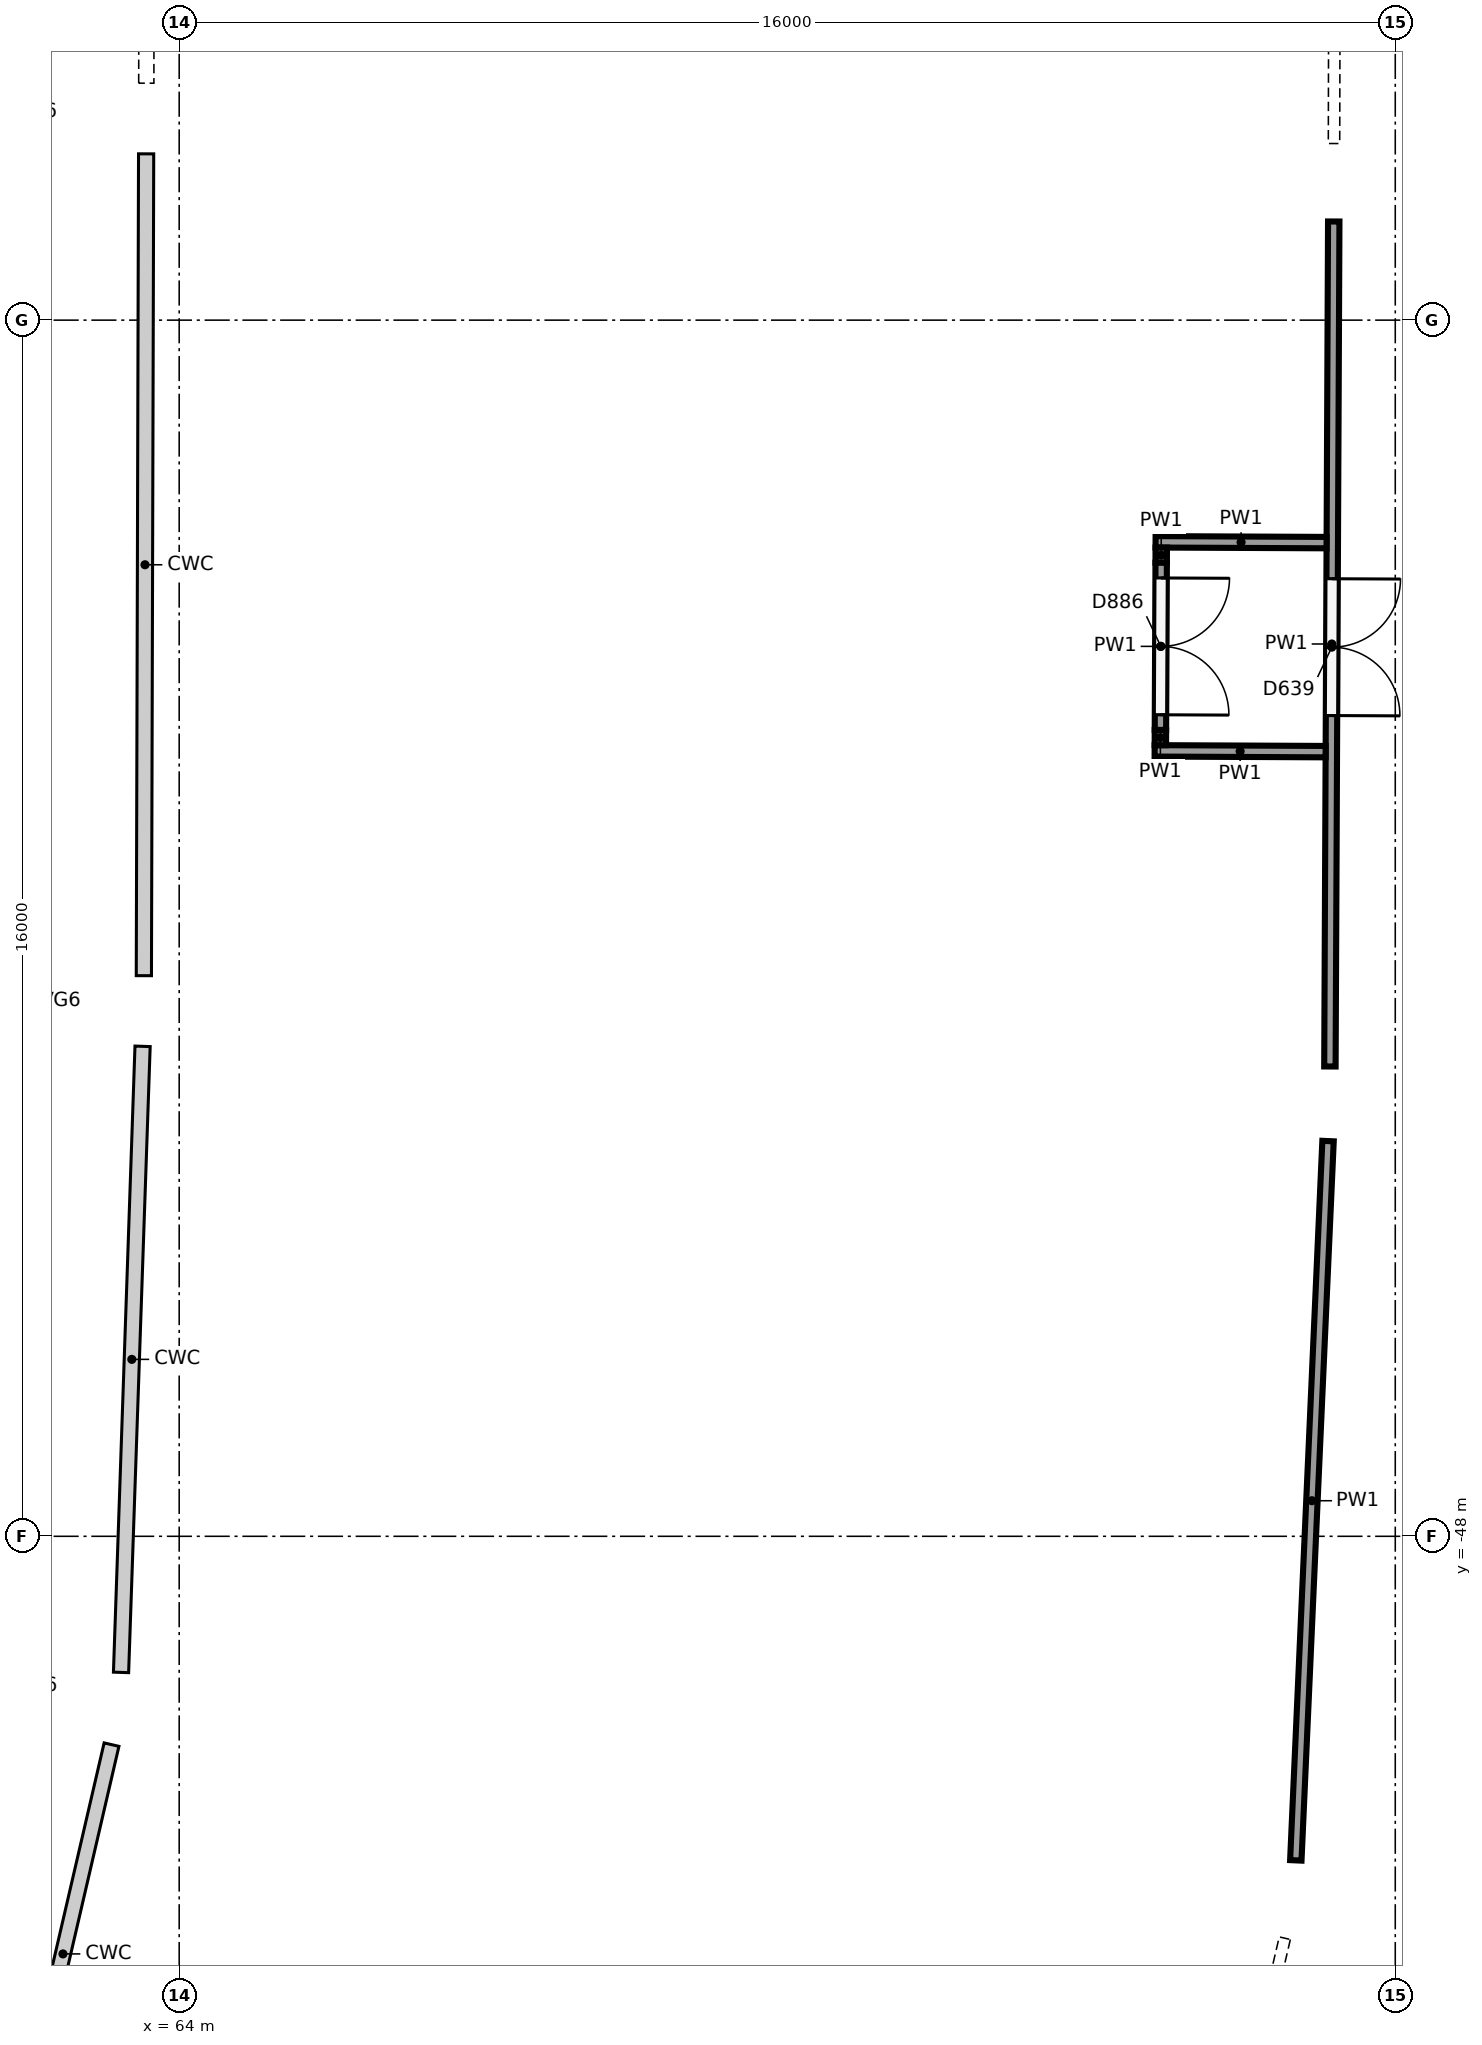
"""IFC4 building model, lengths in metres.
Left out: names, types, materials, properties, quantities, classifications, styles, units other than length and angle.
Written with IfcOpenShell. Run it as: python <this file> out.ifc"""

import sys

from ifc_helpers import new_model, si_unit, direction, frame, frame_2d, origin, origin_2d, place, context, subcontext, project, spatial, rectangle, circle, extrude, element, fill, save


model = new_model("IFC4")
c1 = context("Model", 3, precision=1e-05, world=origin(), true_north=direction((0.0, 1.0)))
c2 = subcontext(c1, "Body", "Model", "MODEL_VIEW")
j1 = project(units=[si_unit("LENGTHUNIT", "METRE"), si_unit("PLANEANGLEUNIT", "RADIAN")], contexts=[c1])
p1 = place(None, origin())
s1 = spatial("IfcSite", under=j1, at=p1, CompositionType="ELEMENT")
p2 = place(p1, origin())
s2 = spatial("IfcBuilding", under=s1, at=p2, CompositionType="ELEMENT")
p3 = place(p2, frame((0.0, 0.0, 6.5)))
s3 = spatial("IfcBuildingStorey", under=s2, at=p3, CompositionType="ELEMENT", Elevation=6.5)
p4 = place(p3, frame((63.218, -50.273, 0.0), z_axis=(0.0, 0.0, 1.0), x_axis=(1.0, 0.0, 0.0)))
e1 = element("IfcColumn", 1, at=p4, inside=s3, PredefinedType="COLUMN", context=c2, shape_type="SweptSolid", body=[
    extrude(circle(Radius=0.45, at=origin_2d()), origin(), (0.0, 0.0, 1.0), 5.5),
])
p5 = place(p3, frame((64.502, -50.48, 0.0), z_axis=(0.0, 0.0, 1.0), x_axis=(1.0, 0.0, 0.0)))
e2 = element("IfcColumn", 2, at=p5, inside=s3, PredefinedType="COLUMN", context=c2, shape_type="SweptSolid", body=[
    extrude(circle(Radius=0.4, at=origin_2d()), origin(), (0.0, 0.0, 1.0), 5.5),
])
for number, where, z_axis, x_axis in (
    (3, (72.992, -51.847, 0.0), (0.0, 0.0, 1.0), (1.0, 0.0, 0.0)),
    (4, (63.534, -41.104, 0.0), (0.0, 0.0, 1.0), (1.0, 0.0, 0.0)),
):
    element("IfcColumn", number, at=place(p3, frame(where, z_axis=z_axis, x_axis=x_axis)), inside=s3, PredefinedType="COLUMN", context=c2, shape_type="SweptSolid", body=[
        extrude(circle(Radius=0.45, at=origin_2d()), origin(), (0.0, 0.0, 1.0), 5.5),
    ])
p6 = place(p3, frame((64.83, -41.204, 0.0), z_axis=(0.0, 0.0, 1.0), x_axis=(1.0, 0.0, 0.0)))
e5 = element("IfcColumn", 5, at=p6, inside=s3, PredefinedType="COLUMN", context=c2, shape_type="SweptSolid", body=[
    extrude(circle(Radius=0.4, at=origin_2d()), origin(), (0.0, 0.0, 1.0), 5.5),
])
for number, where, z_axis, x_axis in (
    (6, (73.405, -41.862, 0.0), (0.0, 0.0, 1.0), (1.0, 0.0, 0.0)),
    (7, (63.566, -29.362, 0.0), (0.0, 0.0, 1.0), (1.0, 0.0, 0.0)),
):
    element("IfcColumn", number, at=place(p3, frame(where, z_axis=z_axis, x_axis=x_axis)), inside=s3, PredefinedType="COLUMN", context=c2, shape_type="SweptSolid", body=[
        extrude(circle(Radius=0.45, at=origin_2d()), origin(), (0.0, 0.0, 1.0), 5.5),
    ])
p7 = place(p3, frame((64.864, -29.433, 0.0), z_axis=(0.0, 0.0, 1.0), x_axis=(1.0, 0.0, 0.0)))
e8 = element("IfcColumn", 8, at=p7, inside=s3, PredefinedType="COLUMN", context=c2, shape_type="SweptSolid", body=[
    extrude(circle(Radius=0.4, at=origin_2d()), origin(), (0.0, 0.0, 1.0), 5.5),
])
p8 = place(p3, frame((73.451, -29.904, 0.0), z_axis=(0.0, 0.0, 1.0), x_axis=(1.0, 0.0, 0.0)))
e9 = element("IfcColumn", 9, at=p8, inside=s3, PredefinedType="COLUMN", context=c2, shape_type="SweptSolid", body=[
    extrude(circle(Radius=0.45, at=origin_2d()), origin(), (0.0, 0.0, 1.0), 5.5),
])
p9 = place(p3, frame((79.19, -30.702, 0.0), z_axis=(0.0, 0.0, 1.0), x_axis=(-0.004546006523, -0.999989666859, 0.0)))
e10 = element("IfcWall", 10, at=p9, inside=s3, PredefinedType="PARTITIONING", context=c2, shape_type="SweptSolid", body=[
    extrude(rectangle(XDim=11.117, YDim=0.15, at=frame_2d((5.558, 0.0))), origin(), (0.0, 0.0, 1.0), 5.15),
])
p10 = place(p9, frame((4.7, 0.0, 0.0)))
e11 = element("IfcOpeningElement", 11, at=p10, cuts=e10, PredefinedType="OPENING", context=c2, shape_type="SweptSolid", body=[
    extrude(rectangle(XDim=1.8, YDim=2.1, at=frame_2d((0.9, 1.05))), frame((0.0, 0.085, 0.0), z_axis=(0.0, -1.0, 0.0), x_axis=(1.0, 0.0, 0.0)), (0.0, 0.0, 1.0), 0.17),
])
p11 = place(p3, frame((79.115, -42.8, 0.0), z_axis=(0.0, 0.0, 1.0), x_axis=(-0.044768155876, -0.99899740351, 0.0)))
e12 = element("IfcWall", 12, at=p11, inside=s3, PredefinedType="PARTITIONING", context=c2, shape_type="SweptSolid", body=[
    extrude(rectangle(XDim=9.473, YDim=0.15, at=frame_2d((4.736, 0.0))), origin(), (0.0, 0.0, 1.0), 5.15),
])
p12 = place(p3, frame((79.219, -18.845, 0.0), z_axis=(0.0, 0.0, 1.0), x_axis=(-0.002254023351, -0.999997459686, 0.0)))
e13 = element("IfcWall", 13, at=p12, inside=s3, PredefinedType="PARTITIONING", context=c2, shape_type="SweptSolid", body=[
    extrude(rectangle(XDim=10.831, YDim=0.15, at=frame_2d((5.416, 0.0))), origin(), (0.0, 0.0, 1.0), 5.15),
])
p13 = place(p3, frame((78.546, -53.287, 0.0), z_axis=(0.0, 0.0, 1.0), x_axis=(-0.226958808722, -0.973904358314, 0.0)))
e14 = element("IfcWall", 14, at=p13, inside=s3, PredefinedType="PARTITIONING", context=c2, shape_type="SweptSolid", body=[
    extrude(rectangle(XDim=7.838, YDim=0.15, at=frame_2d((3.919, 0.0))), origin(), (0.0, 0.0, 1.0), 5.15),
])
p14 = place(p13, frame((3.2, 0.0, 0.0)))
e15 = element("IfcOpeningElement", 15, at=p14, cuts=e14, PredefinedType="OPENING", context=c2, shape_type="SweptSolid", body=[
    extrude(rectangle(XDim=1.2, YDim=2.1, at=frame_2d((0.6, 1.05))), frame((0.0, 0.085, 0.0), z_axis=(0.0, -1.0, 0.0), x_axis=(1.0, 0.0, 0.0)), (0.0, 0.0, 1.0), 0.17),
])
p15 = place(p3, frame((81.513, -47.012, 0.0), z_axis=(0.0, 0.0, 1.0), x_axis=(-0.111965089533, -0.993712140776, 0.0)))
e16 = element("IfcWall", 16, at=p15, inside=s3, PredefinedType="PARTITIONING", context=c2, shape_type="SweptSolid", body=[
    extrude(rectangle(XDim=13.89, YDim=0.15, at=frame_2d((6.945, 0.0))), origin(), (0.0, 0.0, 1.0), 4.05),
])
p16 = place(p15, frame((7.75, 0.0, 0.0)))
e17 = element("IfcOpeningElement", 17, at=p16, cuts=e16, PredefinedType="OPENING", context=c2, shape_type="SweptSolid", body=[
    extrude(rectangle(XDim=1.8, YDim=2.1, at=frame_2d((0.9, 1.05))), frame((0.0, 0.085, 0.0), z_axis=(0.0, -1.0, 0.0), x_axis=(1.0, 0.0, 0.0)), (0.0, 0.0, 1.0), 0.17),
])
for number, where, z_axis, x_axis in (
    (18, (79.096, -34.927, 0.0), (0.0, 0.0, 1.0), (-1.0, 0.005, 0.0)),
    (19, (79.084, -37.677, 0.0), (0.0, 0.0, 1.0), (-1.0, 0.005, 0.0)),
):
    element("IfcWall", number, at=place(p3, frame(where, z_axis=z_axis, x_axis=x_axis)), inside=s3, PredefinedType="PARTITIONING", context=c2, shape_type="SweptSolid", body=[
        extrude(rectangle(XDim=2.25, YDim=0.15, at=frame_2d((1.125, 0.0))), origin(), (0.0, 0.0, 1.0), 5.15),
    ])
p17 = place(p3, frame((76.921, -34.992, 0.0), z_axis=(0.0, 0.0, 1.0), x_axis=(-0.003662979089, -0.99999329127, 0.0)))
e20 = element("IfcWall", 20, at=p17, inside=s3, PredefinedType="PARTITIONING", context=c2, shape_type="SweptSolid", body=[
    extrude(rectangle(XDim=0.2, YDim=0.15, at=frame_2d((0.1, 0.0))), origin(), (0.0, 0.0, 1.0), 5.15),
])
p18 = place(p3, frame((76.92, -35.192, 0.0), z_axis=(0.0, 0.0, 1.0), x_axis=(-0.004549947354, -0.999989648936, 0.0)))
e21 = element("IfcWall", 21, at=p18, inside=s3, PredefinedType="PARTITIONING", context=c2, shape_type="SweptSolid", body=[
    extrude(rectangle(XDim=2.2, YDim=0.15, at=frame_2d((1.1, 0.0))), origin(), (0.0, 0.0, 1.0), 5.15),
])
p19 = place(p18, frame((0.2, 0.0, 0.0)))
e22 = element("IfcOpeningElement", 22, at=p19, cuts=e21, PredefinedType="OPENING", context=c2, shape_type="SweptSolid", body=[
    extrude(rectangle(XDim=1.8, YDim=2.1, at=frame_2d((0.9, 1.05))), frame((0.0, 0.085, 0.0), z_axis=(0.0, -1.0, 0.0), x_axis=(1.0, 0.0, 0.0)), (0.0, 0.0, 1.0), 0.17),
])
p20 = place(p3, frame((76.91, -37.392, 0.0), z_axis=(0.0, 0.0, 1.0), x_axis=(-0.004883946635, -0.999988073462, 0.0)))
e23 = element("IfcWall", 23, at=p20, inside=s3, PredefinedType="PARTITIONING", context=c2, shape_type="SweptSolid", body=[
    extrude(rectangle(XDim=0.2, YDim=0.15, at=frame_2d((0.1, 0.0))), origin(), (0.0, 0.0, 1.0), 5.15),
])
p21 = place(p10, origin())
e24 = element("IfcDoor", 24, at=p21, inside=s3, OperationType="DOUBLE_DOOR_SINGLE_SWING", PredefinedType="DOOR", context=c2, shape_type="SweptSolid", body=[
    extrude(rectangle(XDim=1.8, YDim=2.1, at=frame_2d((0.9, 1.05))), frame((0.0, 0.025, 0.0), z_axis=(0.0, -1.0, 0.0), x_axis=(1.0, 0.0, 0.0)), (0.0, 0.0, 1.0), 0.05),
])
fill(e11, e24)
p22 = place(p19, origin())
e25 = element("IfcDoor", 25, at=p22, inside=s3, OperationType="DOUBLE_DOOR_SINGLE_SWING", PredefinedType="DOOR", context=c2, shape_type="SweptSolid", body=[
    extrude(rectangle(XDim=1.8, YDim=2.1, at=frame_2d((0.9, 1.05))), frame((0.0, 0.025, 0.0), z_axis=(0.0, -1.0, 0.0), x_axis=(1.0, 0.0, 0.0)), (0.0, 0.0, 1.0), 0.05),
])
fill(e22, e25)
save(model, sys.argv[1])
